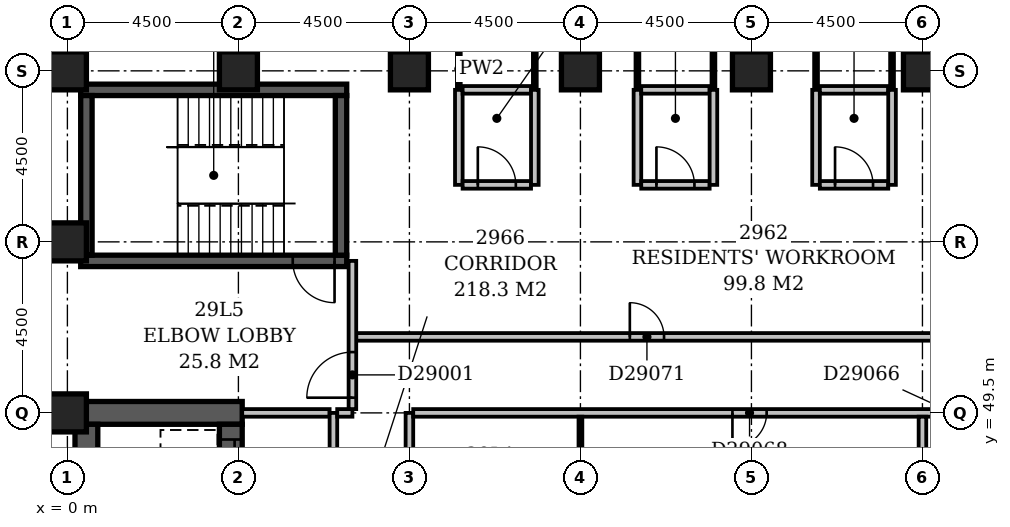
"""IFC4 building model, lengths in metres.
Left out: names, types, materials, properties, quantities, classifications, styles, units other than length and angle.
Written with IfcOpenShell. Run it as: python <this file> out.ifc"""

import sys

from ifc_helpers import new_model, si_unit, direction, frame, frame_2d, origin, origin_2d, place, context, subcontext, project, spatial, rectangle, extrude, element, fill, save


model = new_model("IFC4")
c1 = context("Model", 3, precision=1e-05, world=origin(), true_north=direction((0.0, 1.0)))
c2 = subcontext(c1, "Body", "Model", "MODEL_VIEW")
j1 = project(units=[si_unit("LENGTHUNIT", "METRE"), si_unit("PLANEANGLEUNIT", "RADIAN")], contexts=[c1])
p1 = place(None, origin())
s1 = spatial("IfcSite", under=j1, at=p1, CompositionType="ELEMENT")
p2 = place(p1, origin())
s2 = spatial("IfcBuilding", under=s1, at=p2, CompositionType="ELEMENT")
p3 = place(p2, frame((0.0, 0.0, 119.6)))
s3 = spatial("IfcBuildingStorey", under=s2, at=p3, CompositionType="ELEMENT", Elevation=119.6)
p4 = place(p3, frame((0.2, 49.5, -0.3), z_axis=(0.0, 0.0, 1.0), x_axis=(1.0, 0.0, 0.0)))
e1 = element("IfcWall", 1, at=p4, inside=s3, PredefinedType="SHEAR", context=c2, shape_type="SweptSolid", body=[
    extrude(rectangle(XDim=4.4, YDim=0.6, at=frame_2d((2.2, 0.0))), origin(), (0.0, 0.0, 1.0), 3.6),
])
p5 = place(p3, frame((0.35, 53.5, -0.3), z_axis=(0.0, 0.0, 1.0), x_axis=(1.0, 0.0, 0.0)))
e2 = element("IfcWall", 2, at=p5, inside=s3, PredefinedType="SHEAR", context=c2, shape_type="SweptSolid", body=[
    extrude(rectangle(XDim=7.0, YDim=0.3, at=frame_2d((3.5, 0.0))), origin(), (0.0, 0.0, 1.0), 3.6),
])
p6 = place(p5, frame((5.58, 0.0, 0.3)))
e3 = element("IfcOpeningElement", 3, at=p6, cuts=e2, PredefinedType="OPENING", context=c2, shape_type="SweptSolid", body=[
    extrude(rectangle(XDim=1.1, YDim=2.1, at=frame_2d((0.55, 1.05))), frame((0.0, 0.162, 0.0), z_axis=(0.0, -1.0, 0.0), x_axis=(1.0, 0.0, 0.0)), (0.0, 0.0, 1.0), 0.324),
])
p7 = place(p3, frame((0.35, 58.0, -0.3), z_axis=(0.0, 0.0, 1.0), x_axis=(1.0, 0.0, 0.0)))
e4 = element("IfcWall", 4, at=p7, inside=s3, PredefinedType="SHEAR", context=c2, shape_type="SweptSolid", body=[
    extrude(rectangle(XDim=7.0, YDim=0.3, at=frame_2d((3.5, 0.0))), origin(), (0.0, 0.0, 1.0), 3.6),
])
p8 = place(p3, frame((0.5, 27.15, -0.3), z_axis=(0.0, 0.0, 1.0), x_axis=(0.0, 1.0, 0.0)))
e5 = element("IfcWall", 5, at=p8, inside=s3, PredefinedType="SHEAR", context=c2, shape_type="SweptSolid", body=[
    extrude(rectangle(XDim=22.05, YDim=0.6, at=frame_2d((11.025, 0.0))), origin(), (0.0, 0.0, 1.0), 3.6),
])
p9 = place(p3, frame((0.5, 53.65, -0.3), z_axis=(0.0, 0.0, 1.0), x_axis=(0.0, 1.0, 0.0)))
e6 = element("IfcWall", 6, at=p9, inside=s3, PredefinedType="SHEAR", context=c2, shape_type="SweptSolid", body=[
    extrude(rectangle(XDim=4.2, YDim=0.3, at=frame_2d((2.1, 0.0))), origin(), (0.0, 0.0, 1.0), 3.6),
])
p10 = place(p3, frame((4.3, 27.15, -0.3), z_axis=(0.0, 0.0, 1.0), x_axis=(0.0, 1.0, 0.0)))
e7 = element("IfcWall", 7, at=p10, inside=s3, PredefinedType="SHEAR", context=c2, shape_type="SweptSolid", body=[
    extrude(rectangle(XDim=22.05, YDim=0.6, at=frame_2d((11.025, 0.0))), origin(), (0.0, 0.0, 1.0), 3.6),
])
p11 = place(p10, frame((3.05, 0.0, 0.3)))
e8 = element("IfcOpeningElement", 8, at=p11, cuts=e7, PredefinedType="OPENING", context=c2, shape_type="SweptSolid", body=[
    extrude(rectangle(XDim=1.1, YDim=2.1, at=frame_2d((0.55, 1.05))), frame((0.0, 0.312, 0.0), z_axis=(0.0, -1.0, 0.0), x_axis=(1.0, 0.0, 0.0)), (0.0, 0.0, 1.0), 0.624),
])
p12 = place(p10, frame((0.55, 0.0, 0.3)))
e9 = element("IfcOpeningElement", 9, at=p12, cuts=e7, PredefinedType="OPENING", context=c2, shape_type="SweptSolid", body=[
    extrude(rectangle(XDim=1.1, YDim=2.1, at=frame_2d((0.55, 1.05))), frame((0.0, 0.312, 0.0), z_axis=(0.0, -1.0, 0.0), x_axis=(1.0, 0.0, 0.0)), (0.0, 0.0, 1.0), 0.624),
])
p13 = place(p10, frame((20.55, 0.0, 0.3)))
e10 = element("IfcOpeningElement", 10, at=p13, cuts=e7, PredefinedType="OPENING", context=c2, shape_type="SweptSolid", body=[
    extrude(rectangle(XDim=1.1, YDim=2.1, at=frame_2d((0.55, 1.05))), frame((0.0, 0.312, 0.0), z_axis=(0.0, -1.0, 0.0), x_axis=(1.0, 0.0, 0.0)), (0.0, 0.0, 1.0), 0.624),
])
p14 = place(p10, frame((18.05, 0.0, 0.3)))
e11 = element("IfcOpeningElement", 11, at=p14, cuts=e7, PredefinedType="OPENING", context=c2, shape_type="SweptSolid", body=[
    extrude(rectangle(XDim=1.1, YDim=2.1, at=frame_2d((0.55, 1.05))), frame((0.0, 0.312, 0.0), z_axis=(0.0, -1.0, 0.0), x_axis=(1.0, 0.0, 0.0)), (0.0, 0.0, 1.0), 0.624),
])
p15 = place(p10, frame((15.55, 0.0, 0.3)))
e12 = element("IfcOpeningElement", 12, at=p15, cuts=e7, PredefinedType="OPENING", context=c2, shape_type="SweptSolid", body=[
    extrude(rectangle(XDim=1.1, YDim=2.1, at=frame_2d((0.55, 1.05))), frame((0.0, 0.312, 0.0), z_axis=(0.0, -1.0, 0.0), x_axis=(1.0, 0.0, 0.0)), (0.0, 0.0, 1.0), 0.624),
])
p16 = place(p10, frame((13.05, 0.0, 0.3)))
e13 = element("IfcOpeningElement", 13, at=p16, cuts=e7, PredefinedType="OPENING", context=c2, shape_type="SweptSolid", body=[
    extrude(rectangle(XDim=1.1, YDim=2.1, at=frame_2d((0.55, 1.05))), frame((0.0, 0.312, 0.0), z_axis=(0.0, -1.0, 0.0), x_axis=(1.0, 0.0, 0.0)), (0.0, 0.0, 1.0), 0.624),
])
p17 = place(p10, frame((10.55, 0.0, 0.3)))
e14 = element("IfcOpeningElement", 14, at=p17, cuts=e7, PredefinedType="OPENING", context=c2, shape_type="SweptSolid", body=[
    extrude(rectangle(XDim=1.1, YDim=2.1, at=frame_2d((0.55, 1.05))), frame((0.0, 0.312, 0.0), z_axis=(0.0, -1.0, 0.0), x_axis=(1.0, 0.0, 0.0)), (0.0, 0.0, 1.0), 0.624),
])
p18 = place(p10, frame((8.05, 0.0, 0.3)))
e15 = element("IfcOpeningElement", 15, at=p18, cuts=e7, PredefinedType="OPENING", context=c2, shape_type="SweptSolid", body=[
    extrude(rectangle(XDim=1.1, YDim=2.1, at=frame_2d((0.55, 1.05))), frame((0.0, 0.312, 0.0), z_axis=(0.0, -1.0, 0.0), x_axis=(1.0, 0.0, 0.0)), (0.0, 0.0, 1.0), 0.624),
])
p19 = place(p10, frame((5.55, 0.0, 0.3)))
e16 = element("IfcOpeningElement", 16, at=p19, cuts=e7, PredefinedType="OPENING", context=c2, shape_type="SweptSolid", body=[
    extrude(rectangle(XDim=1.1, YDim=2.1, at=frame_2d((0.55, 1.05))), frame((0.0, 0.312, 0.0), z_axis=(0.0, -1.0, 0.0), x_axis=(1.0, 0.0, 0.0)), (0.0, 0.0, 1.0), 0.624),
])
p20 = place(p3, frame((7.2, 53.65, -0.3), z_axis=(0.0, 0.0, 1.0), x_axis=(0.0, 1.0, 0.0)))
e17 = element("IfcWall", 17, at=p20, inside=s3, PredefinedType="SHEAR", context=c2, shape_type="SweptSolid", body=[
    extrude(rectangle(XDim=4.2, YDim=0.3, at=frame_2d((2.1, 0.0))), origin(), (0.0, 0.0, 1.0), 3.6),
])
for number, where, z_axis, x_axis in (
    (18, (0.0, 49.5, -0.3), (0.0, 0.0, 1.0), (1.0, 0.0, 0.0)),
    (19, (0.0, 54.0, -0.3), (0.0, 0.0, 1.0), (1.0, 0.0, 0.0)),
    (20, (0.0, 58.5, -0.3), (0.0, 0.0, 1.0), (1.0, 0.0, 0.0)),
    (21, (4.5, 58.5, -0.3), (0.0, 0.0, 1.0), (1.0, 0.0, 0.0)),
    (22, (9.0, 58.5, -0.3), (0.0, 0.0, 1.0), (1.0, 0.0, 0.0)),
    (23, (13.5, 58.5, -0.3), (0.0, 0.0, 1.0), (1.0, 0.0, 0.0)),
    (24, (18.0, 58.5, -0.3), (0.0, 0.0, 1.0), (1.0, 0.0, 0.0)),
    (25, (22.5, 58.5, -0.3), (0.0, 0.0, 1.0), (1.0, 0.0, 0.0)),
):
    element("IfcColumn", number, at=place(p3, frame(where, z_axis=z_axis, x_axis=x_axis)), inside=s3, PredefinedType="COLUMN", context=c2, shape_type="SweptSolid", body=[
        extrude(rectangle(XDim=1.0, YDim=1.0, at=origin_2d()), origin(), (0.0, 0.0, 1.0), 3.6),
    ])
p21 = place(p3, frame((7.0, 34.6, 0.0), z_axis=(0.0, 0.0, 1.0), x_axis=(0.0, 1.0, 0.0)))
e26 = element("IfcWall", 26, at=p21, inside=s3, PredefinedType="PARTITIONING", context=c2, shape_type="SweptSolid", body=[
    extrude(rectangle(XDim=14.9, YDim=0.2, at=frame_2d((7.45, 0.0))), origin(), (0.0, 0.0, 1.0), 3.3),
])
p22 = place(p21, frame((2.8, 0.0, 0.0)))
e27 = element("IfcOpeningElement", 27, at=p22, cuts=e26, PredefinedType="OPENING", context=c2, shape_type="SweptSolid", body=[
    extrude(rectangle(XDim=1.2, YDim=2.1, at=frame_2d((0.6, 1.05))), frame((0.0, 0.112, 0.0), z_axis=(0.0, -1.0, 0.0), x_axis=(1.0, 0.0, 0.0)), (0.0, 0.0, 1.0), 0.224),
])
p23 = place(p21, frame((9.8, 0.0, 0.0)))
e28 = element("IfcOpeningElement", 28, at=p23, cuts=e26, PredefinedType="OPENING", context=c2, shape_type="SweptSolid", body=[
    extrude(rectangle(XDim=1.2, YDim=2.1, at=frame_2d((0.6, 1.05))), frame((0.0, 0.112, 0.0), z_axis=(0.0, -1.0, 0.0), x_axis=(1.0, 0.0, 0.0)), (0.0, 0.0, 1.0), 0.224),
])
p24 = place(p3, frame((4.6, 49.5, 0.0), z_axis=(0.0, 0.0, 1.0), x_axis=(1.0, 0.0, 0.0)))
e29 = element("IfcWall", 29, at=p24, inside=s3, PredefinedType="PARTITIONING", context=c2, shape_type="SweptSolid", body=[
    extrude(rectangle(XDim=2.3, YDim=0.2, at=frame_2d((1.15, 0.0))), origin(), (0.0, 0.0, 1.0), 3.3),
])
p25 = place(p3, frame((7.1, 49.5, 0.0), z_axis=(0.0, 0.0, 1.0), x_axis=(1.0, 0.0, 0.0)))
e30 = element("IfcWall", 30, at=p25, inside=s3, PredefinedType="PARTITIONING", context=c2, shape_type="SweptSolid", body=[
    extrude(rectangle(XDim=0.4, YDim=0.2, at=frame_2d((0.2, 0.0))), origin(), (0.0, 0.0, 1.0), 3.3),
])
p26 = place(p3, frame((7.5, 49.6, 0.0), z_axis=(0.0, 0.0, 1.0), x_axis=(0.0, 1.0, 0.0)))
e31 = element("IfcWall", 31, at=p26, inside=s3, PredefinedType="PARTITIONING", context=c2, shape_type="SweptSolid", body=[
    extrude(rectangle(XDim=3.9, YDim=0.2, at=frame_2d((1.95, 0.0))), origin(), (0.0, 0.0, 1.0), 3.3),
])
p27 = place(p26, frame((0.3, 0.0, 0.0)))
e32 = element("IfcOpeningElement", 32, at=p27, cuts=e31, PredefinedType="OPENING", context=c2, shape_type="SweptSolid", body=[
    extrude(rectangle(XDim=1.2, YDim=2.1, at=frame_2d((0.6, 1.05))), frame((0.0, 0.112, 0.0), z_axis=(0.0, -1.0, 0.0), x_axis=(1.0, 0.0, 0.0)), (0.0, 0.0, 1.0), 0.224),
])
p28 = place(p3, frame((9.0, 34.75, 0.0), z_axis=(0.0, 0.0, 1.0), x_axis=(0.0, 1.0, 0.0)))
e33 = element("IfcWall", 33, at=p28, inside=s3, PredefinedType="PARTITIONING", context=c2, shape_type="SweptSolid", body=[
    extrude(rectangle(XDim=14.75, YDim=0.2, at=frame_2d((7.375, 0.0))), origin(), (0.0, 0.0, 1.0), 3.3),
])
p29 = place(p28, frame((7.5, 0.0, 0.0)))
e34 = element("IfcOpeningElement", 34, at=p29, cuts=e33, PredefinedType="OPENING", context=c2, shape_type="SweptSolid", body=[
    extrude(rectangle(XDim=0.9, YDim=2.1, at=frame_2d((0.45, 1.05))), frame((0.0, 0.112, 0.0), z_axis=(0.0, -1.0, 0.0), x_axis=(1.0, 0.0, 0.0)), (0.0, 0.0, 1.0), 0.224),
])
p30 = place(p3, frame((13.5, 36.1, 0.0), z_axis=(0.0, 0.0, 1.0), x_axis=(0.0, 1.0, 0.0)))
e35 = element("IfcWall", 35, at=p30, inside=s3, PredefinedType="PARTITIONING", context=c2, shape_type="SweptSolid", body=[
    extrude(rectangle(XDim=13.3, YDim=0.1, at=frame_2d((6.65, 0.0))), origin(), (0.0, 0.0, 1.0), 3.3),
])
p31 = place(p3, frame((22.5, 36.5, 0.0), z_axis=(0.0, 0.0, 1.0), x_axis=(0.0, 1.0, 0.0)))
e36 = element("IfcWall", 36, at=p31, inside=s3, PredefinedType="PARTITIONING", context=c2, shape_type="SweptSolid", body=[
    extrude(rectangle(XDim=12.9, YDim=0.2, at=frame_2d((6.45, 0.0))), origin(), (0.0, 0.0, 1.0), 3.3),
])
p32 = place(p3, frame((9.1, 49.5, 0.0), z_axis=(0.0, 0.0, 1.0), x_axis=(1.0, 0.0, 0.0)))
e37 = element("IfcWall", 37, at=p32, inside=s3, PredefinedType="PARTITIONING", context=c2, shape_type="SweptSolid", body=[
    extrude(rectangle(XDim=41.55, YDim=0.2, at=frame_2d((20.775, 0.0))), origin(), (0.0, 0.0, 1.0), 3.3),
])
p33 = place(p32, frame((13.7, 0.0, 0.0)))
e38 = element("IfcOpeningElement", 38, at=p33, cuts=e37, PredefinedType="OPENING", context=c2, shape_type="SweptSolid", body=[
    extrude(rectangle(XDim=1.0, YDim=2.1, at=frame_2d((0.5, 1.05))), frame((0.0, 0.112, 0.0), z_axis=(0.0, -1.0, 0.0), x_axis=(1.0, 0.0, 0.0)), (0.0, 0.0, 1.0), 0.224),
])
p34 = place(p32, frame((27.8, 0.0, 0.0)))
e39 = element("IfcOpeningElement", 39, at=p34, cuts=e37, PredefinedType="OPENING", context=c2, shape_type="SweptSolid", body=[
    extrude(rectangle(XDim=1.0, YDim=2.1, at=frame_2d((0.5, 1.05))), frame((0.0, 0.112, 0.0), z_axis=(0.0, -1.0, 0.0), x_axis=(1.0, 0.0, 0.0)), (0.0, 0.0, 1.0), 0.224),
])
p35 = place(p32, frame((8.4, 0.0, 0.0)))
e40 = element("IfcOpeningElement", 40, at=p35, cuts=e37, PredefinedType="OPENING", context=c2, shape_type="SweptSolid", body=[
    extrude(rectangle(XDim=0.9, YDim=2.1, at=frame_2d((0.45, 1.05))), frame((0.0, 0.112, 0.0), z_axis=(0.0, -1.0, 0.0), x_axis=(1.0, 0.0, 0.0)), (0.0, 0.0, 1.0), 0.224),
])
p36 = place(p3, frame((7.6, 51.5, 0.0), z_axis=(0.0, 0.0, 1.0), x_axis=(1.0, 0.0, 0.0)))
e41 = element("IfcWall", 41, at=p36, inside=s3, PredefinedType="PARTITIONING", context=c2, shape_type="SweptSolid", body=[
    extrude(rectangle(XDim=15.3, YDim=0.2, at=frame_2d((7.65, 0.0))), origin(), (0.0, 0.0, 1.0), 3.3),
])
p37 = place(p36, frame((7.2, 0.0, 0.0)))
e42 = element("IfcOpeningElement", 42, at=p37, cuts=e41, PredefinedType="OPENING", context=c2, shape_type="SweptSolid", body=[
    extrude(rectangle(XDim=0.9, YDim=2.1, at=frame_2d((0.45, 1.05))), frame((0.0, 0.112, 0.0), z_axis=(0.0, -1.0, 0.0), x_axis=(1.0, 0.0, 0.0)), (0.0, 0.0, 1.0), 0.224),
])
p38 = place(p3, frame((10.3, 55.5, 0.0), z_axis=(0.0, 0.0, 1.0), x_axis=(0.0, 1.0, 0.0)))
e43 = element("IfcWall", 43, at=p38, inside=s3, PredefinedType="PARTITIONING", context=c2, shape_type="SweptSolid", body=[
    extrude(rectangle(XDim=2.5, YDim=0.2, at=frame_2d((1.25, 0.0))), origin(), (0.0, 0.0, 1.0), 3.3),
])
p39 = place(p3, frame((10.4, 55.5, 0.0), z_axis=(0.0, 0.0, 1.0), x_axis=(1.0, 0.0, 0.0)))
e44 = element("IfcWall", 44, at=p39, inside=s3, PredefinedType="PARTITIONING", context=c2, shape_type="SweptSolid", body=[
    extrude(rectangle(XDim=1.8, YDim=0.2, at=frame_2d((0.9, 0.0))), origin(), (0.0, 0.0, 1.0), 3.3),
])
p40 = place(p39, frame((0.4, 0.0, 0.0)))
e45 = element("IfcOpeningElement", 45, at=p40, cuts=e44, PredefinedType="OPENING", context=c2, shape_type="SweptSolid", body=[
    extrude(rectangle(XDim=1.0, YDim=2.1, at=frame_2d((0.5, 1.05))), frame((0.0, 0.112, 0.0), z_axis=(0.0, -1.0, 0.0), x_axis=(1.0, 0.0, 0.0)), (0.0, 0.0, 1.0), 0.224),
])
for number, where, z_axis, x_axis in (
    (46, (12.3, 55.5, 0.0), (0.0, 0.0, 1.0), (0.0, 1.0, 0.0)),
    (47, (15.0, 55.5, 0.0), (0.0, 0.0, 1.0), (0.0, 1.0, 0.0)),
):
    element("IfcWall", number, at=place(p3, frame(where, z_axis=z_axis, x_axis=x_axis)), inside=s3, PredefinedType="PARTITIONING", context=c2, shape_type="SweptSolid", body=[
        extrude(rectangle(XDim=2.5, YDim=0.2, at=frame_2d((1.25, 0.0))), origin(), (0.0, 0.0, 1.0), 3.3),
    ])
p41 = place(p3, frame((15.1, 55.5, 0.0), z_axis=(0.0, 0.0, 1.0), x_axis=(1.0, 0.0, 0.0)))
e48 = element("IfcWall", 48, at=p41, inside=s3, PredefinedType="PARTITIONING", context=c2, shape_type="SweptSolid", body=[
    extrude(rectangle(XDim=1.8, YDim=0.2, at=frame_2d((0.9, 0.0))), origin(), (0.0, 0.0, 1.0), 3.3),
])
p42 = place(p41, frame((0.4, 0.0, 0.0)))
e49 = element("IfcOpeningElement", 49, at=p42, cuts=e48, PredefinedType="OPENING", context=c2, shape_type="SweptSolid", body=[
    extrude(rectangle(XDim=1.0, YDim=2.1, at=frame_2d((0.5, 1.05))), frame((0.0, 0.112, 0.0), z_axis=(0.0, -1.0, 0.0), x_axis=(1.0, 0.0, 0.0)), (0.0, 0.0, 1.0), 0.224),
])
for number, where, z_axis, x_axis in (
    (50, (17.0, 55.5, 0.0), (0.0, 0.0, 1.0), (0.0, 1.0, 0.0)),
    (51, (19.7, 55.5, 0.0), (0.0, 0.0, 1.0), (0.0, 1.0, 0.0)),
):
    element("IfcWall", number, at=place(p3, frame(where, z_axis=z_axis, x_axis=x_axis)), inside=s3, PredefinedType="PARTITIONING", context=c2, shape_type="SweptSolid", body=[
        extrude(rectangle(XDim=2.5, YDim=0.2, at=frame_2d((1.25, 0.0))), origin(), (0.0, 0.0, 1.0), 3.3),
    ])
p43 = place(p3, frame((19.8, 55.5, 0.0), z_axis=(0.0, 0.0, 1.0), x_axis=(1.0, 0.0, 0.0)))
e52 = element("IfcWall", 52, at=p43, inside=s3, PredefinedType="PARTITIONING", context=c2, shape_type="SweptSolid", body=[
    extrude(rectangle(XDim=1.8, YDim=0.2, at=frame_2d((0.9, 0.0))), origin(), (0.0, 0.0, 1.0), 3.3),
])
p44 = place(p43, frame((0.4, 0.0, 0.0)))
e53 = element("IfcOpeningElement", 53, at=p44, cuts=e52, PredefinedType="OPENING", context=c2, shape_type="SweptSolid", body=[
    extrude(rectangle(XDim=1.0, YDim=2.1, at=frame_2d((0.5, 1.05))), frame((0.0, 0.112, 0.0), z_axis=(0.0, -1.0, 0.0), x_axis=(1.0, 0.0, 0.0)), (0.0, 0.0, 1.0), 0.224),
])
p45 = place(p3, frame((21.7, 55.5, 0.0), z_axis=(0.0, 0.0, 1.0), x_axis=(0.0, 1.0, 0.0)))
e54 = element("IfcWall", 54, at=p45, inside=s3, PredefinedType="PARTITIONING", context=c2, shape_type="SweptSolid", body=[
    extrude(rectangle(XDim=2.5, YDim=0.2, at=frame_2d((1.25, 0.0))), origin(), (0.0, 0.0, 1.0), 3.3),
])
p46 = place(p3, frame((10.3, 58.0, 0.0), z_axis=(0.0, 0.0, 1.0), x_axis=(0.0, 1.0, 0.0)))
e55 = element("IfcWall", 55, at=p46, inside=s3, PredefinedType="PARTITIONING", context=c2, shape_type="SweptSolid", body=[
    extrude(rectangle(XDim=1.1, YDim=0.1, at=frame_2d((0.55, 0.0))), origin(), (0.0, 0.0, 1.0), 3.3),
])
p47 = place(p3, frame((10.4, 58.0, 0.0), z_axis=(0.0, 0.0, 1.0), x_axis=(1.0, 0.0, 0.0)))
e56 = element("IfcWall", 56, at=p47, inside=s3, PredefinedType="PARTITIONING", context=c2, shape_type="SweptSolid", body=[
    extrude(rectangle(XDim=1.8, YDim=0.2, at=frame_2d((0.9, 0.0))), origin(), (0.0, 0.0, 1.0), 3.3),
])
for number, where, z_axis, x_axis in (
    (57, (12.3, 58.0, 0.0), (0.0, 0.0, 1.0), (0.0, 1.0, 0.0)),
    (58, (15.0, 58.0, 0.0), (0.0, 0.0, 1.0), (0.0, 1.0, 0.0)),
):
    element("IfcWall", number, at=place(p3, frame(where, z_axis=z_axis, x_axis=x_axis)), inside=s3, PredefinedType="PARTITIONING", context=c2, shape_type="SweptSolid", body=[
        extrude(rectangle(XDim=1.1, YDim=0.1, at=frame_2d((0.55, 0.0))), origin(), (0.0, 0.0, 1.0), 3.3),
    ])
p48 = place(p3, frame((15.1, 58.0, 0.0), z_axis=(0.0, 0.0, 1.0), x_axis=(1.0, 0.0, 0.0)))
e59 = element("IfcWall", 59, at=p48, inside=s3, PredefinedType="PARTITIONING", context=c2, shape_type="SweptSolid", body=[
    extrude(rectangle(XDim=1.8, YDim=0.2, at=frame_2d((0.9, 0.0))), origin(), (0.0, 0.0, 1.0), 3.3),
])
for number, where, z_axis, x_axis in (
    (60, (17.0, 58.0, 0.0), (0.0, 0.0, 1.0), (0.0, 1.0, 0.0)),
    (61, (19.7, 58.0, 0.0), (0.0, 0.0, 1.0), (0.0, 1.0, 0.0)),
):
    element("IfcWall", number, at=place(p3, frame(where, z_axis=z_axis, x_axis=x_axis)), inside=s3, PredefinedType="PARTITIONING", context=c2, shape_type="SweptSolid", body=[
        extrude(rectangle(XDim=1.1, YDim=0.1, at=frame_2d((0.55, 0.0))), origin(), (0.0, 0.0, 1.0), 3.3),
    ])
p49 = place(p3, frame((19.8, 58.0, 0.0), z_axis=(0.0, 0.0, 1.0), x_axis=(1.0, 0.0, 0.0)))
e62 = element("IfcWall", 62, at=p49, inside=s3, PredefinedType="PARTITIONING", context=c2, shape_type="SweptSolid", body=[
    extrude(rectangle(XDim=1.8, YDim=0.2, at=frame_2d((0.9, 0.0))), origin(), (0.0, 0.0, 1.0), 3.3),
])
p50 = place(p3, frame((21.7, 58.0, 0.0), z_axis=(0.0, 0.0, 1.0), x_axis=(0.0, 1.0, 0.0)))
e63 = element("IfcWall", 63, at=p50, inside=s3, PredefinedType="PARTITIONING", context=c2, shape_type="SweptSolid", body=[
    extrude(rectangle(XDim=1.1, YDim=0.1, at=frame_2d((0.55, 0.0))), origin(), (0.0, 0.0, 1.0), 3.3),
])
p51 = place(p27, origin())
e64 = element("IfcDoor", 64, at=p51, inside=s3, OperationType="SINGLE_SWING_LEFT", PredefinedType="DOOR", context=c2, shape_type="SweptSolid", body=[
    extrude(rectangle(XDim=1.2, YDim=2.1, at=frame_2d((0.6, 1.05))), frame((0.0, 0.025, 0.0), z_axis=(0.0, -1.0, 0.0), x_axis=(1.0, 0.0, 0.0)), (0.0, 0.0, 1.0), 0.05),
])
fill(e32, e64)
p52 = place(p13, origin())
e65 = element("IfcDoor", 65, at=p52, inside=s3, OperationType="SLIDING_TO_LEFT", PredefinedType="DOOR", context=c2, shape_type="SweptSolid", body=[
    extrude(rectangle(XDim=1.1, YDim=2.1, at=frame_2d((0.55, 1.05))), frame((0.0, 0.025, 0.0), z_axis=(0.0, -1.0, 0.0), x_axis=(1.0, 0.0, 0.0)), (0.0, 0.0, 1.0), 0.05),
])
fill(e10, e65)
p53 = place(p6, origin())
e66 = element("IfcDoor", 66, at=p53, inside=s3, OperationType="SINGLE_SWING_RIGHT", PredefinedType="DOOR", context=c2, shape_type="SweptSolid", body=[
    extrude(rectangle(XDim=1.1, YDim=2.1, at=frame_2d((0.55, 1.05))), frame((0.0, 0.025, 0.0), z_axis=(0.0, -1.0, 0.0), x_axis=(1.0, 0.0, 0.0)), (0.0, 0.0, 1.0), 0.05),
])
fill(e3, e66)
p54 = place(p35, frame((0.9, 0.0, 0.0), z_axis=(0.0, 0.0, 1.0), x_axis=(-1.0, 0.0, 0.0)))
e67 = element("IfcDoor", 67, at=p54, inside=s3, OperationType="SINGLE_SWING_RIGHT", PredefinedType="DOOR", context=c2, shape_type="SweptSolid", body=[
    extrude(rectangle(XDim=0.9, YDim=2.1, at=frame_2d((0.45, 1.05))), frame((0.0, 0.025, 0.0), z_axis=(0.0, -1.0, 0.0), x_axis=(1.0, 0.0, 0.0)), (0.0, 0.0, 1.0), 0.05),
])
fill(e40, e67)
p55 = place(p37, origin())
e68 = element("IfcDoor", 68, at=p55, inside=s3, OperationType="SINGLE_SWING_LEFT", PredefinedType="DOOR", context=c2, shape_type="SweptSolid", body=[
    extrude(rectangle(XDim=0.9, YDim=2.1, at=frame_2d((0.45, 1.05))), frame((0.0, 0.025, 0.0), z_axis=(0.0, -1.0, 0.0), x_axis=(1.0, 0.0, 0.0)), (0.0, 0.0, 1.0), 0.05),
])
fill(e42, e68)
p56 = place(p40, origin())
e69 = element("IfcDoor", 69, at=p56, inside=s3, OperationType="SINGLE_SWING_LEFT", PredefinedType="DOOR", context=c2, shape_type="SweptSolid", body=[
    extrude(rectangle(XDim=1.0, YDim=2.1, at=frame_2d((0.5, 1.05))), frame((0.0, 0.025, 0.0), z_axis=(0.0, -1.0, 0.0), x_axis=(1.0, 0.0, 0.0)), (0.0, 0.0, 1.0), 0.05),
])
fill(e45, e69)
p57 = place(p42, origin())
e70 = element("IfcDoor", 70, at=p57, inside=s3, OperationType="SINGLE_SWING_LEFT", PredefinedType="DOOR", context=c2, shape_type="SweptSolid", body=[
    extrude(rectangle(XDim=1.0, YDim=2.1, at=frame_2d((0.5, 1.05))), frame((0.0, 0.025, 0.0), z_axis=(0.0, -1.0, 0.0), x_axis=(1.0, 0.0, 0.0)), (0.0, 0.0, 1.0), 0.05),
])
fill(e49, e70)
p58 = place(p44, origin())
e71 = element("IfcDoor", 71, at=p58, inside=s3, OperationType="SINGLE_SWING_LEFT", PredefinedType="DOOR", context=c2, shape_type="SweptSolid", body=[
    extrude(rectangle(XDim=1.0, YDim=2.1, at=frame_2d((0.5, 1.05))), frame((0.0, 0.025, 0.0), z_axis=(0.0, -1.0, 0.0), x_axis=(1.0, 0.0, 0.0)), (0.0, 0.0, 1.0), 0.05),
])
fill(e53, e71)
save(model, sys.argv[1])
